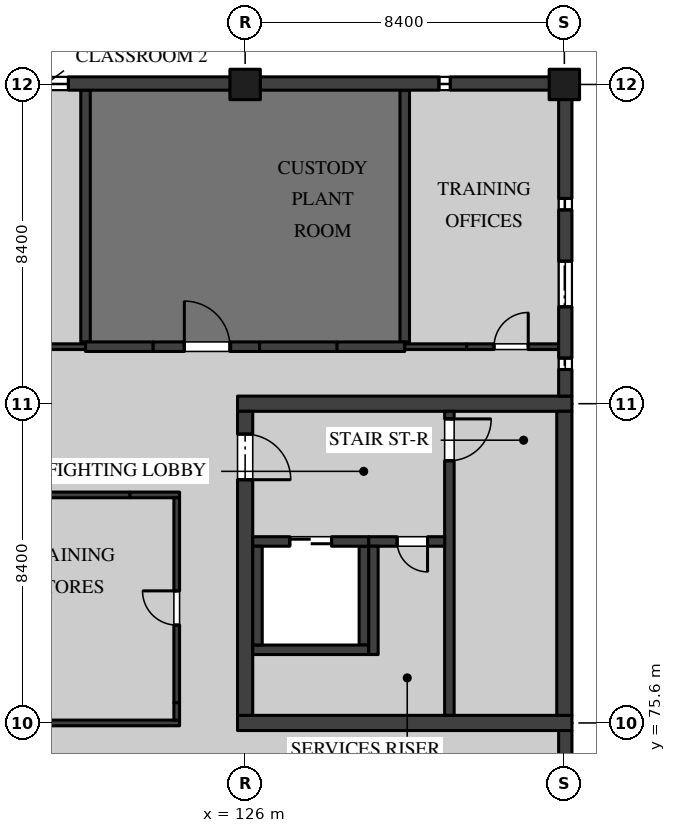
"""IFC4 building model, lengths in metres.
Left out: names, types, materials, properties, quantities, classifications, styles, units other than length and angle.
Written with IfcOpenShell. Run it as: python <this file> out.ifc"""

import sys

from ifc_helpers import new_model, si_unit, direction, frame, frame_2d, origin, origin_2d, place, context, subcontext, project, spatial, rectangle, extrude, element, fill, save


model = new_model("IFC4")
c1 = context("Model", 3, precision=1e-05, world=origin(), true_north=direction((0.0, 1.0)))
c2 = subcontext(c1, "Body", "Model", "MODEL_VIEW")
j1 = project(units=[si_unit("LENGTHUNIT", "METRE"), si_unit("PLANEANGLEUNIT", "RADIAN")], contexts=[c1])
p1 = place(None, origin())
s1 = spatial("IfcSite", under=j1, at=p1, CompositionType="ELEMENT")
p2 = place(p1, origin())
s2 = spatial("IfcBuilding", under=s1, at=p2, CompositionType="ELEMENT")
p3 = place(p2, frame((0.0, 0.0, 5.4)))
s3 = spatial("IfcBuildingStorey", under=s2, at=p3, CompositionType="ELEMENT", Elevation=5.4)
for number, where, z_axis, x_axis in (
    (1, (126.0, 92.4, 0.0), (0.0, 0.0, 1.0), (1.0, 0.0, 0.0)),
    (2, (134.4, 92.4, 0.0), (0.0, 0.0, 1.0), (1.0, 0.0, 0.0)),
):
    element("IfcColumn", number, at=place(p3, frame(where, z_axis=z_axis, x_axis=x_axis)), inside=s3, PredefinedType="COLUMN", context=c2, shape_type="SweptSolid", body=[
        extrude(rectangle(XDim=0.8, YDim=0.8, at=origin_2d()), origin(), (0.0, 0.0, 1.0), 4.37),
    ])
for number, where, z_axis, x_axis in (
    (3, (125.8, 75.6, 0.0), (0.0, 0.0, 1.0), (1.0, 0.0, 0.0)),
    (4, (125.8, 84.0, 0.0), (0.0, 0.0, 1.0), (1.0, 0.0, 0.0)),
):
    element("IfcWall", number, at=place(p3, frame(where, z_axis=z_axis, x_axis=x_axis)), inside=s3, PredefinedType="SHEAR", context=c2, shape_type="SweptSolid", body=[
        extrude(rectangle(XDim=8.8, YDim=0.4, at=frame_2d((4.4, 0.0))), origin(), (0.0, 0.0, 1.0), 4.37),
    ])
p4 = place(p3, frame((126.0, 75.8, 0.0), z_axis=(0.0, 0.0, 1.0), x_axis=(0.0, 1.0, 0.0)))
e5 = element("IfcWall", 5, at=p4, inside=s3, PredefinedType="SHEAR", context=c2, shape_type="SweptSolid", body=[
    extrude(rectangle(XDim=8.0, YDim=0.4, at=frame_2d((4.0, 0.0))), origin(), (0.0, 0.0, 1.0), 4.37),
])
p5 = place(p4, frame((6.2, 0.0, 0.0)))
e6 = element("IfcOpeningElement", 6, at=p5, cuts=e5, PredefinedType="OPENING", context=c2, shape_type="SweptSolid", body=[
    extrude(rectangle(XDim=1.2, YDim=2.1, at=frame_2d((0.6, 1.05))), frame((0.0, 0.21, 0.0), z_axis=(0.0, -1.0, 0.0), x_axis=(1.0, 0.0, 0.0)), (0.0, 0.0, 1.0), 0.42),
])
p6 = place(p3, frame((134.4, 75.8, 0.0), z_axis=(0.0, 0.0, 1.0), x_axis=(0.0, 1.0, 0.0)))
e7 = element("IfcWall", 7, at=p6, inside=s3, PredefinedType="SHEAR", context=c2, shape_type="SweptSolid", body=[
    extrude(rectangle(XDim=8.0, YDim=0.4, at=frame_2d((4.0, 0.0))), origin(), (0.0, 0.0, 1.0), 4.37),
])
p7 = place(p3, frame((131.375, 83.8, 0.0), z_axis=(0.0, 0.0, 1.0), x_axis=(0.0, -1.0, 0.0)))
e8 = element("IfcWall", 8, at=p7, inside=s3, PredefinedType="SOLIDWALL", context=c2, shape_type="SweptSolid", body=[
    extrude(rectangle(XDim=8.0, YDim=0.25, at=frame_2d((4.0, 0.0))), origin(), (0.0, 0.0, 1.0), 4.37),
])
p8 = place(p7, frame((0.2, 0.0, 0.0)))
e9 = element("IfcOpeningElement", 9, at=p8, cuts=e8, PredefinedType="OPENING", context=c2, shape_type="SweptSolid", body=[
    extrude(rectangle(XDim=1.1, YDim=2.1, at=frame_2d((0.55, 1.05))), frame((0.0, 0.135, 0.0), z_axis=(0.0, -1.0, 0.0), x_axis=(1.0, 0.0, 0.0)), (0.0, 0.0, 1.0), 0.27),
])
p9 = place(p3, frame((131.25, 80.375, 0.0), z_axis=(0.0, 0.0, 1.0), x_axis=(-1.0, 0.0, 0.0)))
e10 = element("IfcWall", 10, at=p9, inside=s3, PredefinedType="SOLIDWALL", context=c2, shape_type="SweptSolid", body=[
    extrude(rectangle(XDim=2.0, YDim=0.25, at=frame_2d((1.0, 0.0))), origin(), (0.0, 0.0, 1.0), 4.37),
])
p10 = place(p9, frame((0.45, 0.0, 0.0)))
e11 = element("IfcOpeningElement", 11, at=p10, cuts=e10, PredefinedType="OPENING", context=c2, shape_type="SweptSolid", body=[
    extrude(rectangle(XDim=0.8, YDim=2.1, at=frame_2d((0.4, 1.05))), frame((0.0, 0.135, 0.0), z_axis=(0.0, -1.0, 0.0), x_axis=(1.0, 0.0, 0.0)), (0.0, 0.0, 1.0), 0.27),
])
p11 = place(p3, frame((129.375, 80.25, 0.0), z_axis=(0.0, 0.0, 1.0), x_axis=(0.0, -1.0, 0.0)))
e12 = element("IfcWall", 12, at=p11, inside=s3, PredefinedType="SOLIDWALL", context=c2, shape_type="SweptSolid", body=[
    extrude(rectangle(XDim=2.85, YDim=0.25, at=frame_2d((1.425, 0.0))), origin(), (0.0, 0.0, 1.0), 4.37),
])
p12 = place(p3, frame((129.125, 77.65, 0.0), z_axis=(0.0, 0.0, 1.0), x_axis=(0.0, 1.0, 0.0)))
e13 = element("IfcWall", 13, at=p12, inside=s3, PredefinedType="SOLIDWALL", context=c2, shape_type="SweptSolid", body=[
    extrude(rectangle(XDim=2.6, YDim=0.25, at=frame_2d((1.3, 0.0))), origin(), (0.0, 0.0, 1.0), 4.37),
])
p13 = place(p3, frame((126.2, 80.375, 0.0), z_axis=(0.0, 0.0, 1.0), x_axis=(1.0, 0.0, 0.0)))
e14 = element("IfcWall", 14, at=p13, inside=s3, PredefinedType="SOLIDWALL", context=c2, shape_type="SweptSolid", body=[
    extrude(rectangle(XDim=3.05, YDim=0.25, at=frame_2d((1.525, 0.0))), origin(), (0.0, 0.0, 1.0), 4.37),
])
p14 = place(p13, frame((0.975, 0.0, 0.0)))
e15 = element("IfcOpeningElement", 15, at=p14, cuts=e14, PredefinedType="OPENING", context=c2, shape_type="SweptSolid", body=[
    extrude(rectangle(XDim=1.1, YDim=2.1, at=frame_2d((0.55, 1.05))), frame((0.0, 0.135, 0.0), z_axis=(0.0, -1.0, 0.0), x_axis=(1.0, 0.0, 0.0)), (0.0, 0.0, 1.0), 0.27),
])
p15 = place(p3, frame((126.2, 77.525, 0.0), z_axis=(0.0, 0.0, 1.0), x_axis=(1.0, 0.0, 0.0)))
e16 = element("IfcWall", 16, at=p15, inside=s3, PredefinedType="SOLIDWALL", context=c2, shape_type="SweptSolid", body=[
    extrude(rectangle(XDim=3.05, YDim=0.25, at=frame_2d((1.525, 0.0))), origin(), (0.0, 0.0, 1.0), 4.37),
])
p16 = place(p3, frame((126.325, 77.65, 0.0), z_axis=(0.0, 0.0, 1.0), x_axis=(0.0, 1.0, 0.0)))
e17 = element("IfcWall", 17, at=p16, inside=s3, PredefinedType="SOLIDWALL", context=c2, shape_type="SweptSolid", body=[
    extrude(rectangle(XDim=2.6, YDim=0.25, at=frame_2d((1.3, 0.0))), origin(), (0.0, 0.0, 1.0), 4.37),
])
p17 = place(p3, frame((119.4, 75.6, 0.0), z_axis=(0.0, 0.0, 1.0), x_axis=(1.0, 0.0, 0.0)))
e18 = element("IfcWall", 18, at=p17, inside=s3, PredefinedType="PARTITIONING", context=c2, shape_type="SweptSolid", body=[
    extrude(rectangle(XDim=4.875, YDim=0.15, at=frame_2d((2.438, 0.0))), origin(), (0.0, 0.0, 1.0), 3.746),
])
p18 = place(p3, frame((120.63, 81.6, 0.0), z_axis=(0.0, 0.0, 1.0), x_axis=(1.0, 0.0, 0.0)))
e19 = element("IfcWall", 19, at=p18, inside=s3, PredefinedType="PARTITIONING", context=c2, shape_type="SweptSolid", body=[
    extrude(rectangle(XDim=2.34, YDim=0.15, at=frame_2d((1.17, 0.0))), origin(), (0.0, 0.0, 1.0), 4.37),
])
p19 = place(p3, frame((122.97, 81.6, 0.0), z_axis=(0.0, 0.0, 1.0), x_axis=(1.0, 0.0, 0.0)))
e20 = element("IfcWall", 20, at=p19, inside=s3, PredefinedType="PARTITIONING", context=c2, shape_type="SweptSolid", body=[
    extrude(rectangle(XDim=1.305, YDim=0.15, at=frame_2d((0.652, 0.0))), origin(), (0.0, 0.0, 1.0), 3.895),
])
p20 = place(p3, frame((124.2, 75.675, 0.0), z_axis=(0.0, 0.0, 1.0), x_axis=(0.0, 1.0, 0.0)))
e21 = element("IfcWall", 21, at=p20, inside=s3, PredefinedType="PARTITIONING", context=c2, shape_type="SweptSolid", body=[
    extrude(rectangle(XDim=0.46, YDim=0.15, at=frame_2d((0.23, 0.0))), origin(), (0.0, 0.0, 1.0), 3.746),
])
p21 = place(p3, frame((124.2, 76.135, 0.0), z_axis=(0.0, 0.0, 1.0), x_axis=(0.0, 1.0, 0.0)))
e22 = element("IfcWall", 22, at=p21, inside=s3, PredefinedType="PARTITIONING", context=c2, shape_type="SweptSolid", body=[
    extrude(rectangle(XDim=5.39, YDim=0.15, at=frame_2d((2.695, 0.0))), origin(), (0.0, 0.0, 1.0), 4.37),
])
p22 = place(p21, frame((2.04, 0.0, 0.0)))
e23 = element("IfcOpeningElement", 23, at=p22, cuts=e22, PredefinedType="OPENING", context=c2, shape_type="SweptSolid", body=[
    extrude(rectangle(XDim=0.9, YDim=2.1, at=frame_2d((0.45, 1.05))), frame((0.0, 0.085, 0.0), z_axis=(0.0, -1.0, 0.0), x_axis=(1.0, 0.0, 0.0)), (0.0, 0.0, 1.0), 0.17),
])
p23 = place(p3, frame((121.8, 85.625, 0.0), z_axis=(0.0, 0.0, 1.0), x_axis=(0.0, 1.0, 0.0)))
e24 = element("IfcWall", 24, at=p23, inside=s3, PredefinedType="PARTITIONING", context=c2, shape_type="SweptSolid", body=[
    extrude(rectangle(XDim=6.625, YDim=0.25, at=frame_2d((3.312, 0.0))), origin(), (0.0, 0.0, 1.0), 4.37),
])
p24 = place(p3, frame((120.17, 85.5, 0.0), z_axis=(0.0, 0.0, 1.0), x_axis=(1.0, 0.0, 0.0)))
e25 = element("IfcWall", 25, at=p24, inside=s3, PredefinedType="PARTITIONING", context=c2, shape_type="SweptSolid", body=[
    extrude(rectangle(XDim=1.63, YDim=0.15, at=frame_2d((0.815, 0.0))), origin(), (0.0, 0.0, 1.0), 3.895),
])
p25 = place(p3, frame((130.2, 85.625, 0.0), z_axis=(0.0, 0.0, 1.0), x_axis=(0.0, 1.0, 0.0)))
e26 = element("IfcWall", 26, at=p25, inside=s3, PredefinedType="PARTITIONING", context=c2, shape_type="SweptSolid", body=[
    extrude(rectangle(XDim=6.625, YDim=0.25, at=frame_2d((3.312, 0.0))), origin(), (0.0, 0.0, 1.0), 4.37),
])
p26 = place(p3, frame((121.8, 85.5, 0.0), z_axis=(0.0, 0.0, 1.0), x_axis=(1.0, 0.0, 0.0)))
e27 = element("IfcWall", 27, at=p26, inside=s3, PredefinedType="PARTITIONING", context=c2, shape_type="SweptSolid", body=[
    extrude(rectangle(XDim=1.78, YDim=0.25, at=frame_2d((0.89, 0.0))), origin(), (0.0, 0.0, 1.0), 3.895),
])
p27 = place(p3, frame((123.58, 85.5, 0.0), z_axis=(0.0, 0.0, 1.0), x_axis=(1.0, 0.0, 0.0)))
e28 = element("IfcWall", 28, at=p27, inside=s3, PredefinedType="PARTITIONING", context=c2, shape_type="SweptSolid", body=[
    extrude(rectangle(XDim=2.04, YDim=0.25, at=frame_2d((1.02, 0.0))), origin(), (0.0, 0.0, 1.0), 4.37),
])
p28 = place(p27, frame((0.82, 0.0, 0.0)))
e29 = element("IfcOpeningElement", 29, at=p28, cuts=e28, PredefinedType="OPENING", context=c2, shape_type="SweptSolid", body=[
    extrude(rectangle(XDim=1.2, YDim=2.4, at=frame_2d((0.6, 1.2))), frame((0.0, 0.135, 0.0), z_axis=(0.0, -1.0, 0.0), x_axis=(1.0, 0.0, 0.0)), (0.0, 0.0, 1.0), 0.27),
])
p29 = place(p3, frame((125.62, 85.5, 0.0), z_axis=(0.0, 0.0, 1.0), x_axis=(1.0, 0.0, 0.0)))
e30 = element("IfcWall", 30, at=p29, inside=s3, PredefinedType="PARTITIONING", context=c2, shape_type="SweptSolid", body=[
    extrude(rectangle(XDim=0.76, YDim=0.25, at=frame_2d((0.38, 0.0))), origin(), (0.0, 0.0, 1.0), 3.746),
])
p30 = place(p3, frame((126.38, 85.5, 0.0), z_axis=(0.0, 0.0, 1.0), x_axis=(1.0, 0.0, 0.0)))
e31 = element("IfcWall", 31, at=p30, inside=s3, PredefinedType="PARTITIONING", context=c2, shape_type="SweptSolid", body=[
    extrude(rectangle(XDim=2.04, YDim=0.25, at=frame_2d((1.02, 0.0))), origin(), (0.0, 0.0, 1.0), 4.37),
])
p31 = place(p3, frame((128.42, 85.5, 0.0), z_axis=(0.0, 0.0, 1.0), x_axis=(1.0, 0.0, 0.0)))
e32 = element("IfcWall", 32, at=p31, inside=s3, PredefinedType="PARTITIONING", context=c2, shape_type="SweptSolid", body=[
    extrude(rectangle(XDim=1.78, YDim=0.25, at=frame_2d((0.89, 0.0))), origin(), (0.0, 0.0, 1.0), 3.895),
])
p32 = place(p3, frame((130.2, 85.5, 0.0), z_axis=(0.0, 0.0, 1.0), x_axis=(1.0, 0.0, 0.0)))
e33 = element("IfcWall", 33, at=p32, inside=s3, PredefinedType="PARTITIONING", context=c2, shape_type="SweptSolid", body=[
    extrude(rectangle(XDim=1.63, YDim=0.15, at=frame_2d((0.815, 0.0))), origin(), (0.0, 0.0, 1.0), 3.895),
])
p33 = place(p3, frame((131.83, 85.5, 0.0), z_axis=(0.0, 0.0, 1.0), x_axis=(1.0, 0.0, 0.0)))
e34 = element("IfcWall", 34, at=p33, inside=s3, PredefinedType="PARTITIONING", context=c2, shape_type="SweptSolid", body=[
    extrude(rectangle(XDim=2.42, YDim=0.15, at=frame_2d((1.21, 0.0))), origin(), (0.0, 0.0, 1.0), 4.37),
])
p34 = place(p33, frame((0.72, 0.0, 0.0)))
e35 = element("IfcOpeningElement", 35, at=p34, cuts=e34, PredefinedType="OPENING", context=c2, shape_type="SweptSolid", body=[
    extrude(rectangle(XDim=0.9, YDim=2.1, at=frame_2d((0.45, 1.05))), frame((0.0, 0.085, 0.0), z_axis=(0.0, -1.0, 0.0), x_axis=(1.0, 0.0, 0.0)), (0.0, 0.0, 1.0), 0.17),
])
p35 = place(p3, frame((134.425, 67.58, 0.0), z_axis=(0.0, 0.0, 1.0), x_axis=(0.0, 1.0, 0.0)))
e36 = element("IfcWall", 36, at=p35, inside=s3, PredefinedType="SOLIDWALL", context=c2, shape_type="SweptSolid", body=[
    extrude(rectangle(XDim=7.82, YDim=0.35, at=frame_2d((3.91, 0.0))), origin(), (0.0, 0.0, 1.0), 3.746),
])
p36 = place(p35, frame((2.02, 0.0, 1.5)))
e37 = element("IfcOpeningElement", 37, at=p36, cuts=e36, PredefinedType="OPENING", context=c2, shape_type="SweptSolid", body=[
    extrude(rectangle(XDim=1.5, YDim=1.65, at=frame_2d((0.75, 0.825))), frame((0.0, 0.185, 0.0), z_axis=(0.0, -1.0, 0.0), x_axis=(1.0, 0.0, 0.0)), (0.0, 0.0, 1.0), 0.37),
])
p37 = place(p35, frame((4.12, 0.0, 1.5)))
e38 = element("IfcOpeningElement", 38, at=p37, cuts=e36, PredefinedType="OPENING", context=c2, shape_type="SweptSolid", body=[
    extrude(rectangle(XDim=1.5, YDim=1.65, at=frame_2d((0.75, 0.825))), frame((0.0, 0.185, 0.0), z_axis=(0.0, -1.0, 0.0), x_axis=(1.0, 0.0, 0.0)), (0.0, 0.0, 1.0), 0.37),
])
p38 = place(p3, frame((134.425, 84.2, 0.0), z_axis=(0.0, 0.0, 1.0), x_axis=(0.0, 1.0, 0.0)))
e39 = element("IfcWall", 39, at=p38, inside=s3, PredefinedType="SOLIDWALL", context=c2, shape_type="SweptSolid", body=[
    extrude(rectangle(XDim=7.82, YDim=0.35, at=frame_2d((3.91, 0.0))), origin(), (0.0, 0.0, 1.0), 3.746),
])
p39 = place(p38, frame((0.7, 0.0, 1.5)))
e40 = element("IfcOpeningElement", 40, at=p39, cuts=e39, PredefinedType="OPENING", context=c2, shape_type="SweptSolid", body=[
    extrude(rectangle(XDim=0.3, YDim=1.5, at=frame_2d((0.15, 0.75))), frame((0.0, 0.185, 0.0), z_axis=(0.0, -1.0, 0.0), x_axis=(1.0, 0.0, 0.0)), (0.0, 0.0, 1.0), 0.37),
])
p40 = place(p38, frame((2.35, 0.0, 1.5)))
e41 = element("IfcOpeningElement", 41, at=p40, cuts=e39, PredefinedType="OPENING", context=c2, shape_type="SweptSolid", body=[
    extrude(rectangle(XDim=1.2, YDim=1.65, at=frame_2d((0.6, 0.825))), frame((0.0, 0.185, 0.0), z_axis=(0.0, -1.0, 0.0), x_axis=(1.0, 0.0, 0.0)), (0.0, 0.0, 1.0), 0.37),
])
p41 = place(p38, frame((4.9, 0.0, 1.5)))
e42 = element("IfcOpeningElement", 42, at=p41, cuts=e39, PredefinedType="OPENING", context=c2, shape_type="SweptSolid", body=[
    extrude(rectangle(XDim=0.3, YDim=1.5, at=frame_2d((0.15, 0.75))), frame((0.0, 0.185, 0.0), z_axis=(0.0, -1.0, 0.0), x_axis=(1.0, 0.0, 0.0)), (0.0, 0.0, 1.0), 0.37),
])
p42 = place(p3, frame((134.02, 92.425, 0.0), z_axis=(0.0, 0.0, 1.0), x_axis=(-1.0, 0.0, 0.0)))
e43 = element("IfcWall", 43, at=p42, inside=s3, PredefinedType="SOLIDWALL", context=c2, shape_type="SweptSolid", body=[
    extrude(rectangle(XDim=7.64, YDim=0.35, at=frame_2d((3.82, 0.0))), origin(), (0.0, 0.0, 1.0), 3.746),
])
p43 = place(p42, frame((2.62, 0.0, 1.5)))
e44 = element("IfcOpeningElement", 44, at=p43, cuts=e43, PredefinedType="OPENING", context=c2, shape_type="SweptSolid", body=[
    extrude(rectangle(XDim=0.3, YDim=1.5, at=frame_2d((0.15, 0.75))), frame((0.0, 0.185, 0.0), z_axis=(0.0, -1.0, 0.0), x_axis=(1.0, 0.0, 0.0)), (0.0, 0.0, 1.0), 0.37),
])
p44 = place(p3, frame((125.62, 92.425, 0.0), z_axis=(0.0, 0.0, 1.0), x_axis=(-1.0, 0.0, 0.0)))
e45 = element("IfcWall", 45, at=p44, inside=s3, PredefinedType="SOLIDWALL", context=c2, shape_type="SweptSolid", body=[
    extrude(rectangle(XDim=7.64, YDim=0.35, at=frame_2d((3.82, 0.0))), origin(), (0.0, 0.0, 1.0), 3.746),
])
p45 = place(p44, frame((4.27, 0.0, 1.5)))
e46 = element("IfcOpeningElement", 46, at=p45, cuts=e45, PredefinedType="OPENING", context=c2, shape_type="SweptSolid", body=[
    extrude(rectangle(XDim=1.2, YDim=1.8, at=frame_2d((0.6, 0.9))), frame((0.0, 0.185, 0.0), z_axis=(0.0, -1.0, 0.0), x_axis=(1.0, 0.0, 0.0)), (0.0, 0.0, 1.0), 0.37),
])
p46 = place(p44, frame((6.82, 0.0, 1.5)))
e47 = element("IfcOpeningElement", 47, at=p46, cuts=e45, PredefinedType="OPENING", context=c2, shape_type="SweptSolid", body=[
    extrude(rectangle(XDim=0.3, YDim=1.5, at=frame_2d((0.15, 0.75))), frame((0.0, 0.185, 0.0), z_axis=(0.0, -1.0, 0.0), x_axis=(1.0, 0.0, 0.0)), (0.0, 0.0, 1.0), 0.37),
])
p47 = place(p5, frame((1.2, 0.0, 0.0), z_axis=(0.0, 0.0, 1.0), x_axis=(-1.0, 0.0, 0.0)))
e48 = element("IfcDoor", 48, at=p47, inside=s3, OperationType="SINGLE_SWING_LEFT", PredefinedType="DOOR", context=c2, shape_type="SweptSolid", body=[
    extrude(rectangle(XDim=1.2, YDim=2.1, at=frame_2d((0.6, 1.05))), frame((0.0, 0.035, 0.0), z_axis=(0.0, -1.0, 0.0), x_axis=(1.0, 0.0, 0.0)), (0.0, 0.0, 1.0), 0.07),
])
fill(e6, e48)
p48 = place(p10, origin())
e49 = element("IfcDoor", 49, at=p48, inside=s3, OperationType="SINGLE_SWING_RIGHT", PredefinedType="DOOR", context=c2, shape_type="SweptSolid", body=[
    extrude(rectangle(XDim=0.8, YDim=2.1, at=frame_2d((0.4, 1.05))), frame((0.0, 0.035, 0.0), z_axis=(0.0, -1.0, 0.0), x_axis=(1.0, 0.0, 0.0)), (0.0, 0.0, 1.0), 0.07),
])
fill(e11, e49)
p49 = place(p8, origin())
e50 = element("IfcDoor", 50, at=p49, inside=s3, OperationType="SINGLE_SWING_RIGHT", PredefinedType="DOOR", context=c2, shape_type="SweptSolid", body=[
    extrude(rectangle(XDim=1.1, YDim=2.1, at=frame_2d((0.55, 1.05))), frame((0.0, 0.035, 0.0), z_axis=(0.0, -1.0, 0.0), x_axis=(1.0, 0.0, 0.0)), (0.0, 0.0, 1.0), 0.07),
])
fill(e9, e50)
p50 = place(p14, origin())
e51 = element("IfcDoor", 51, at=p50, inside=s3, OperationType="DOUBLE_DOOR_SLIDING", PredefinedType="DOOR", context=c2, shape_type="SweptSolid", body=[
    extrude(rectangle(XDim=1.1, YDim=2.1, at=frame_2d((0.55, 1.05))), frame((0.0, 0.04, 0.0), z_axis=(0.0, -1.0, 0.0), x_axis=(1.0, 0.0, 0.0)), (0.0, 0.0, 1.0), 0.08),
])
fill(e15, e51)
p51 = place(p22, origin())
e52 = element("IfcDoor", 52, at=p51, inside=s3, OperationType="SINGLE_SWING_LEFT", PredefinedType="DOOR", context=c2, shape_type="SweptSolid", body=[
    extrude(rectangle(XDim=0.9, YDim=2.1, at=frame_2d((0.45, 1.05))), frame((0.0, 0.025, 0.0), z_axis=(0.0, -1.0, 0.0), x_axis=(1.0, 0.0, 0.0)), (0.0, 0.0, 1.0), 0.05),
])
fill(e23, e52)
p52 = place(p28, origin())
e53 = element("IfcDoor", 53, at=p52, inside=s3, OperationType="SINGLE_SWING_RIGHT", PredefinedType="DOOR", context=c2, shape_type="SweptSolid", body=[
    extrude(rectangle(XDim=1.2, YDim=2.4, at=frame_2d((0.6, 1.2))), frame((0.0, 0.05, 0.0), z_axis=(0.0, -1.0, 0.0), x_axis=(1.0, 0.0, 0.0)), (0.0, 0.0, 1.0), 0.1),
])
fill(e29, e53)
p53 = place(p34, origin())
e54 = element("IfcDoor", 54, at=p53, inside=s3, OperationType="SINGLE_SWING_LEFT", PredefinedType="DOOR", context=c2, shape_type="SweptSolid", body=[
    extrude(rectangle(XDim=0.9, YDim=2.1, at=frame_2d((0.45, 1.05))), frame((0.0, 0.025, 0.0), z_axis=(0.0, -1.0, 0.0), x_axis=(1.0, 0.0, 0.0)), (0.0, 0.0, 1.0), 0.05),
])
fill(e35, e54)
p54 = place(p39, origin())
e55 = element("IfcWindow", 55, at=p54, inside=s3, PartitioningType="SINGLE_PANEL", PredefinedType="WINDOW", context=c2, shape_type="SweptSolid", body=[
    extrude(rectangle(XDim=0.3, YDim=1.5, at=frame_2d((0.15, 0.75))), frame((0.0, 0.05, 0.0), z_axis=(0.0, -1.0, 0.0), x_axis=(1.0, 0.0, 0.0)), (0.0, 0.0, 1.0), 0.1),
])
fill(e40, e55)
p55 = place(p40, origin())
e56 = element("IfcWindow", 56, at=p55, inside=s3, PartitioningType="SINGLE_PANEL", PredefinedType="WINDOW", context=c2, shape_type="SweptSolid", body=[
    extrude(rectangle(XDim=1.2, YDim=1.65, at=frame_2d((0.6, 0.825))), frame((0.0, 0.04, 0.0), z_axis=(0.0, -1.0, 0.0), x_axis=(1.0, 0.0, 0.0)), (0.0, 0.0, 1.0), 0.08),
])
fill(e41, e56)
p56 = place(p41, origin())
e57 = element("IfcWindow", 57, at=p56, inside=s3, PartitioningType="SINGLE_PANEL", PredefinedType="WINDOW", context=c2, shape_type="SweptSolid", body=[
    extrude(rectangle(XDim=0.3, YDim=1.5, at=frame_2d((0.15, 0.75))), frame((0.0, 0.05, 0.0), z_axis=(0.0, -1.0, 0.0), x_axis=(1.0, 0.0, 0.0)), (0.0, 0.0, 1.0), 0.1),
])
fill(e42, e57)
p57 = place(p43, origin())
e58 = element("IfcWindow", 58, at=p57, inside=s3, PartitioningType="SINGLE_PANEL", PredefinedType="WINDOW", context=c2, shape_type="SweptSolid", body=[
    extrude(rectangle(XDim=0.3, YDim=1.5, at=frame_2d((0.15, 0.75))), frame((0.0, 0.05, 0.0), z_axis=(0.0, -1.0, 0.0), x_axis=(1.0, 0.0, 0.0)), (0.0, 0.0, 1.0), 0.1),
])
fill(e44, e58)
p58 = place(p45, origin())
e59 = element("IfcWindow", 59, at=p58, inside=s3, PartitioningType="SINGLE_PANEL", PredefinedType="WINDOW", context=c2, shape_type="SweptSolid", body=[
    extrude(rectangle(XDim=1.2, YDim=1.8, at=frame_2d((0.6, 0.9))), frame((0.0, 0.03, 0.0), z_axis=(0.0, -1.0, 0.0), x_axis=(1.0, 0.0, 0.0)), (0.0, 0.0, 1.0), 0.06),
])
fill(e46, e59)
save(model, sys.argv[1])
